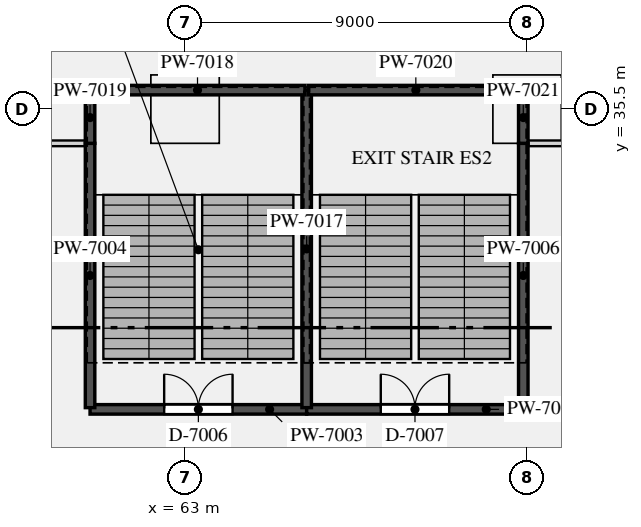
"""IFC4 building model, lengths in metres.
Left out: names, types, materials, properties, quantities, classifications, styles, units other than length and angle.
Written with IfcOpenShell. Run it as: python <this file> out.ifc"""

import sys

from ifc_helpers import new_model, si_unit, direction, frame, frame_2d, origin, origin_2d, place, context, subcontext, project, spatial, rectangle, extrude, element, fill, save


model = new_model("IFC4")
c1 = context("Model", 3, precision=1e-05, world=origin(), true_north=direction((0.0, 1.0)))
c2 = subcontext(c1, "Body", "Model", "MODEL_VIEW")
j1 = project(units=[si_unit("LENGTHUNIT", "METRE"), si_unit("PLANEANGLEUNIT", "RADIAN")], contexts=[c1])
p1 = place(None, origin())
s1 = spatial("IfcSite", under=j1, at=p1, CompositionType="ELEMENT")
p2 = place(p1, origin())
s2 = spatial("IfcBuilding", under=s1, at=p2, CompositionType="ELEMENT")
p3 = place(p2, frame((0.0, 0.0, -6.0)))
s3 = spatial("IfcBuildingStorey", under=s2, at=p3, CompositionType="ELEMENT", Elevation=-6.0)
for number, where, z_axis, x_axis in (
    (1, (63.0, 35.5, -0.5), (0.0, 0.0, 1.0), (1.0, 0.0, 0.0)),
    (2, (72.0, 35.5, -0.5), (0.0, 0.0, 1.0), (1.0, 0.0, 0.0)),
):
    element("IfcColumn", number, at=place(p3, frame(where, z_axis=z_axis, x_axis=x_axis)), inside=s3, PredefinedType="COLUMN", context=c2, shape_type="SweptSolid", body=[
        extrude(rectangle(XDim=1.8, YDim=1.8, at=origin_2d()), origin(), (0.0, 0.0, 1.0), 6.5),
    ])
p4 = place(p3, frame((60.5, 27.6, 0.0), z_axis=(0.0, 0.0, 1.0), x_axis=(1.0, 0.0, 0.0)))
e3 = element("IfcWall", 3, at=p4, inside=s3, PredefinedType="SOLIDWALL", context=c2, shape_type="SweptSolid", body=[
    extrude(rectangle(XDim=5.7, YDim=0.25, at=frame_2d((2.85, 0.0))), origin(), (0.0, 0.0, 1.0), 5.598),
])
p5 = place(p4, frame((1.95, 0.0, 0.0)))
e4 = element("IfcOpeningElement", 4, at=p5, cuts=e3, PredefinedType="OPENING", context=c2, shape_type="SweptSolid", body=[
    extrude(rectangle(XDim=1.8, YDim=2.4, at=frame_2d((0.9, 1.2))), frame((0.0, 0.135, 0.0), z_axis=(0.0, -1.0, 0.0), x_axis=(1.0, 0.0, 0.0)), (0.0, 0.0, 1.0), 0.27),
])
p6 = place(p3, frame((60.5, 27.645, 0.0), z_axis=(0.0, 0.0, 1.0), x_axis=(0.0, 1.0, 0.0)))
e5 = element("IfcWall", 5, at=p6, inside=s3, PredefinedType="SOLIDWALL", context=c2, shape_type="SweptSolid", body=[
    extrude(rectangle(XDim=6.955, YDim=0.25, at=frame_2d((3.478, 0.0))), origin(), (0.0, 0.0, 1.0), 5.598),
])
p7 = place(p3, frame((66.2, 27.6, 0.0), z_axis=(0.0, 0.0, 1.0), x_axis=(1.0, 0.0, 0.0)))
e6 = element("IfcWall", 6, at=p7, inside=s3, PredefinedType="SOLIDWALL", context=c2, shape_type="SweptSolid", body=[
    extrude(rectangle(XDim=5.7, YDim=0.25, at=frame_2d((2.85, 0.0))), origin(), (0.0, 0.0, 1.0), 5.598),
])
p8 = place(p7, frame((1.95, 0.0, 0.0)))
e7 = element("IfcOpeningElement", 7, at=p8, cuts=e6, PredefinedType="OPENING", context=c2, shape_type="SweptSolid", body=[
    extrude(rectangle(XDim=1.8, YDim=2.4, at=frame_2d((0.9, 1.2))), frame((0.0, 0.135, 0.0), z_axis=(0.0, -1.0, 0.0), x_axis=(1.0, 0.0, 0.0)), (0.0, 0.0, 1.0), 0.27),
])
p9 = place(p3, frame((71.9, 27.645, 0.0), z_axis=(0.0, 0.0, 1.0), x_axis=(0.0, 1.0, 0.0)))
e8 = element("IfcWall", 8, at=p9, inside=s3, PredefinedType="SOLIDWALL", context=c2, shape_type="SweptSolid", body=[
    extrude(rectangle(XDim=6.955, YDim=0.25, at=frame_2d((3.478, 0.0))), origin(), (0.0, 0.0, 1.0), 5.598),
])
p10 = place(p3, frame((0.0, 34.6, 0.0), z_axis=(0.0, 0.0, 1.0), x_axis=(1.0, 0.0, 0.0)))
e9 = element("IfcWall", 9, at=p10, inside=s3, PredefinedType="PARTITIONING", context=c2, shape_type="SweptSolid", body=[
    extrude(rectangle(XDim=60.455, YDim=0.15, at=frame_2d((30.228, 0.0))), origin(), (0.0, 0.0, 1.0), 5.598),
])
p11 = place(p10, frame((21.6, 0.0, 0.0)))
e10 = element("IfcOpeningElement", 10, at=p11, cuts=e9, PredefinedType="OPENING", context=c2, shape_type="SweptSolid", body=[
    extrude(rectangle(XDim=1.8, YDim=2.4, at=frame_2d((0.9, 1.2))), frame((0.0, 0.085, 0.0), z_axis=(0.0, -1.0, 0.0), x_axis=(1.0, 0.0, 0.0)), (0.0, 0.0, 1.0), 0.17),
])
p12 = place(p3, frame((71.945, 34.6, 0.0), z_axis=(0.0, 0.0, 1.0), x_axis=(1.0, 0.0, 0.0)))
e11 = element("IfcWall", 11, at=p12, inside=s3, PredefinedType="PARTITIONING", context=c2, shape_type="SweptSolid", body=[
    extrude(rectangle(XDim=18.055, YDim=0.15, at=frame_2d((9.027, 0.0))), origin(), (0.0, 0.0, 1.0), 5.598),
])
p13 = place(p3, frame((66.2, 27.645, 0.0), z_axis=(0.0, 0.0, 1.0), x_axis=(0.0, 1.0, 0.0)))
e12 = element("IfcWall", 12, at=p13, inside=s3, PredefinedType="SOLIDWALL", context=c2, shape_type="SweptSolid", body=[
    extrude(rectangle(XDim=8.355, YDim=0.25, at=frame_2d((4.177, 0.0))), origin(), (0.0, 0.0, 1.0), 5.598),
])
p14 = place(p3, frame((60.5, 36.0, 0.0), z_axis=(0.0, 0.0, 1.0), x_axis=(1.0, 0.0, 0.0)))
e13 = element("IfcWall", 13, at=p14, inside=s3, PredefinedType="SOLIDWALL", context=c2, shape_type="SweptSolid", body=[
    extrude(rectangle(XDim=5.655, YDim=0.25, at=frame_2d((2.828, 0.0))), origin(), (0.0, 0.0, 1.0), 5.598),
])
p15 = place(p3, frame((60.5, 34.6, 0.0), z_axis=(0.0, 0.0, 1.0), x_axis=(0.0, 1.0, 0.0)))
e14 = element("IfcWall", 14, at=p15, inside=s3, PredefinedType="SOLIDWALL", context=c2, shape_type="SweptSolid", body=[
    extrude(rectangle(XDim=1.355, YDim=0.25, at=frame_2d((0.677, 0.0))), origin(), (0.0, 0.0, 1.0), 5.598),
])
p16 = place(p3, frame((66.245, 36.0, 0.0), z_axis=(0.0, 0.0, 1.0), x_axis=(1.0, 0.0, 0.0)))
e15 = element("IfcWall", 15, at=p16, inside=s3, PredefinedType="SOLIDWALL", context=c2, shape_type="SweptSolid", body=[
    extrude(rectangle(XDim=5.655, YDim=0.25, at=frame_2d((2.827, 0.0))), origin(), (0.0, 0.0, 1.0), 5.598),
])
p17 = place(p3, frame((71.9, 34.6, 0.0), z_axis=(0.0, 0.0, 1.0), x_axis=(0.0, 1.0, 0.0)))
e16 = element("IfcWall", 16, at=p17, inside=s3, PredefinedType="SOLIDWALL", context=c2, shape_type="SweptSolid", body=[
    extrude(rectangle(XDim=1.355, YDim=0.25, at=frame_2d((0.677, 0.0))), origin(), (0.0, 0.0, 1.0), 5.598),
])
p18 = place(p5, origin())
e17 = element("IfcDoor", 17, at=p18, inside=s3, OperationType="DOUBLE_DOOR_SINGLE_SWING", PredefinedType="DOOR", context=c2, shape_type="SweptSolid", body=[
    extrude(rectangle(XDim=1.8, YDim=2.4, at=frame_2d((0.9, 1.2))), frame((0.0, 0.025, 0.0), z_axis=(0.0, -1.0, 0.0), x_axis=(1.0, 0.0, 0.0)), (0.0, 0.0, 1.0), 0.05),
])
fill(e4, e17)
p19 = place(p8, origin())
e18 = element("IfcDoor", 18, at=p19, inside=s3, OperationType="DOUBLE_DOOR_SINGLE_SWING", PredefinedType="DOOR", context=c2, shape_type="SweptSolid", body=[
    extrude(rectangle(XDim=1.8, YDim=2.4, at=frame_2d((0.9, 1.2))), frame((0.0, 0.025, 0.0), z_axis=(0.0, -1.0, 0.0), x_axis=(1.0, 0.0, 0.0)), (0.0, 0.0, 1.0), 0.05),
])
fill(e7, e18)
save(model, sys.argv[1])
